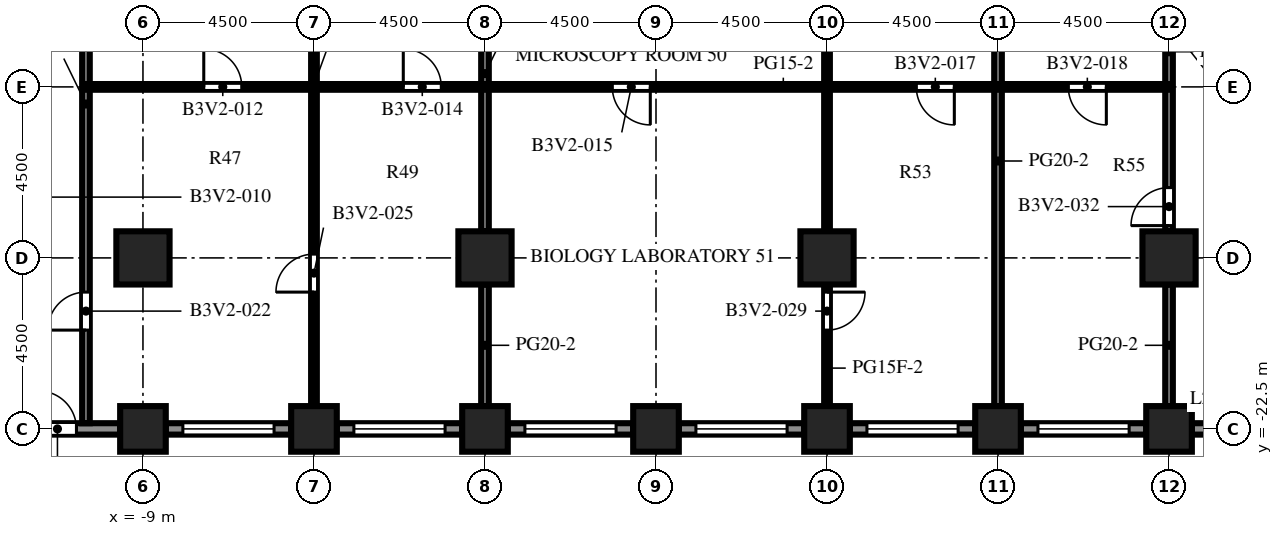
"""IFC4 building model, lengths in metres.
Left out: names, types, materials, properties, quantities, classifications, styles, units other than length and angle.
Written with IfcOpenShell. Run it as: python <this file> out.ifc"""

import sys

from ifc_helpers import new_model, si_unit, direction, frame, frame_2d, origin, origin_2d, place, context, subcontext, project, spatial, rectangle, extrude, element, fill, save


model = new_model("IFC4")
c1 = context("Model", 3, precision=1e-05, world=origin(), true_north=direction((0.0, 1.0)))
c2 = subcontext(c1, "Body", "Model", "MODEL_VIEW")
j1 = project(units=[si_unit("LENGTHUNIT", "METRE"), si_unit("PLANEANGLEUNIT", "RADIAN")], contexts=[c1])
p1 = place(None, origin())
s1 = spatial("IfcSite", under=j1, at=p1, CompositionType="ELEMENT")
p2 = place(p1, origin())
s2 = spatial("IfcBuilding", under=s1, at=p2, CompositionType="ELEMENT")
p3 = place(p2, frame((0.0, 0.0, 106.6)))
s3 = spatial("IfcBuildingStorey", under=s2, at=p3, CompositionType="ELEMENT", Elevation=106.6)
for number, where, z_axis, x_axis in (
    (1, (-9.0, -22.5, 0.0), (0.0, 0.0, 1.0), (1.0, 0.0, 0.0)),
    (2, (-4.5, -22.5, 0.0), (0.0, 0.0, 1.0), (1.0, 0.0, 0.0)),
    (3, (0.0, -22.5, 0.0), (0.0, 0.0, 1.0), (1.0, 0.0, 0.0)),
    (4, (4.5, -22.5, 0.0), (0.0, 0.0, 1.0), (1.0, 0.0, 0.0)),
    (5, (9.0, -22.5, 0.0), (0.0, 0.0, 1.0), (1.0, 0.0, 0.0)),
    (6, (13.5, -22.5, 0.0), (0.0, 0.0, 1.0), (1.0, 0.0, 0.0)),
    (7, (18.0, -22.5, 0.0), (0.0, 0.0, 1.0), (1.0, 0.0, 0.0)),
):
    element("IfcColumn", number, at=place(p3, frame(where, z_axis=z_axis, x_axis=x_axis)), inside=s3, PredefinedType="COLUMN", context=c2, shape_type="SweptSolid", body=[
        extrude(rectangle(XDim=1.2, YDim=1.2, at=origin_2d()), origin(), (0.0, 0.0, 1.0), 4.1),
    ])
for number, where, z_axis, x_axis in (
    (8, (-9.0, -18.0, 0.0), (0.0, 0.0, 1.0), (1.0, 0.0, 0.0)),
    (9, (0.0, -18.0, 0.0), (0.0, 0.0, 1.0), (1.0, 0.0, 0.0)),
    (10, (9.0, -18.0, 0.0), (0.0, 0.0, 1.0), (1.0, 0.0, 0.0)),
    (11, (18.0, -18.0, 0.0), (0.0, 0.0, 1.0), (1.0, 0.0, 0.0)),
):
    element("IfcColumn", number, at=place(p3, frame(where, z_axis=z_axis, x_axis=x_axis)), inside=s3, PredefinedType="COLUMN", context=c2, shape_type="SweptSolid", body=[
        extrude(rectangle(XDim=1.4, YDim=1.4, at=origin_2d()), origin(), (0.0, 0.0, 1.0), 4.1),
    ])
p4 = place(p3, frame((-9.6, -22.5, 0.0), z_axis=(0.0, 0.0, 1.0), x_axis=(-1.0, 0.0, 0.0)))
e12 = element("IfcWall", 12, at=p4, inside=s3, PredefinedType="SOLIDWALL", context=c2, shape_type="SweptSolid", body=[
    extrude(rectangle(XDim=3.3, YDim=0.3, at=frame_2d((1.65, 0.0))), origin(), (0.0, 0.0, 1.0), 2.6),
])
p5 = place(p4, frame((1.15, 0.0, 0.0)))
e13 = element("IfcOpeningElement", 13, at=p5, cuts=e12, PredefinedType="OPENING", context=c2, shape_type="SweptSolid", body=[
    extrude(rectangle(XDim=1.0, YDim=2.2, at=frame_2d((0.5, 1.1))), frame((0.0, 0.16, 0.0), z_axis=(0.0, -1.0, 0.0), x_axis=(1.0, 0.0, 0.0)), (0.0, 0.0, 1.0), 0.32),
])
p6 = place(p3, frame((-5.1, -22.5, 0.0), z_axis=(0.0, 0.0, 1.0), x_axis=(-1.0, 0.0, 0.0)))
e14 = element("IfcWall", 14, at=p6, inside=s3, PredefinedType="SOLIDWALL", context=c2, shape_type="SweptSolid", body=[
    extrude(rectangle(XDim=3.3, YDim=0.3, at=frame_2d((1.65, 0.0))), origin(), (0.0, 0.0, 1.0), 2.6),
])
p7 = place(p6, frame((0.45, 0.0, 0.8)))
e15 = element("IfcOpeningElement", 15, at=p7, cuts=e14, PredefinedType="OPENING", context=c2, shape_type="SweptSolid", body=[
    extrude(rectangle(XDim=2.4, YDim=1.7, at=frame_2d((1.2, 0.85))), frame((0.0, 0.16, 0.0), z_axis=(0.0, -1.0, 0.0), x_axis=(1.0, 0.0, 0.0)), (0.0, 0.0, 1.0), 0.32),
])
p8 = place(p3, frame((-0.6, -22.5, 0.0), z_axis=(0.0, 0.0, 1.0), x_axis=(-1.0, 0.0, 0.0)))
e16 = element("IfcWall", 16, at=p8, inside=s3, PredefinedType="SOLIDWALL", context=c2, shape_type="SweptSolid", body=[
    extrude(rectangle(XDim=3.3, YDim=0.3, at=frame_2d((1.65, 0.0))), origin(), (0.0, 0.0, 1.0), 2.6),
])
p9 = place(p8, frame((0.45, 0.0, 0.8)))
e17 = element("IfcOpeningElement", 17, at=p9, cuts=e16, PredefinedType="OPENING", context=c2, shape_type="SweptSolid", body=[
    extrude(rectangle(XDim=2.4, YDim=1.7, at=frame_2d((1.2, 0.85))), frame((0.0, 0.16, 0.0), z_axis=(0.0, -1.0, 0.0), x_axis=(1.0, 0.0, 0.0)), (0.0, 0.0, 1.0), 0.32),
])
p10 = place(p3, frame((3.9, -22.5, 0.0), z_axis=(0.0, 0.0, 1.0), x_axis=(-1.0, 0.0, 0.0)))
e18 = element("IfcWall", 18, at=p10, inside=s3, PredefinedType="SOLIDWALL", context=c2, shape_type="SweptSolid", body=[
    extrude(rectangle(XDim=3.3, YDim=0.3, at=frame_2d((1.65, 0.0))), origin(), (0.0, 0.0, 1.0), 2.6),
])
p11 = place(p10, frame((0.45, 0.0, 0.8)))
e19 = element("IfcOpeningElement", 19, at=p11, cuts=e18, PredefinedType="OPENING", context=c2, shape_type="SweptSolid", body=[
    extrude(rectangle(XDim=2.4, YDim=1.7, at=frame_2d((1.2, 0.85))), frame((0.0, 0.16, 0.0), z_axis=(0.0, -1.0, 0.0), x_axis=(1.0, 0.0, 0.0)), (0.0, 0.0, 1.0), 0.32),
])
p12 = place(p3, frame((8.4, -22.5, 0.0), z_axis=(0.0, 0.0, 1.0), x_axis=(-1.0, 0.0, 0.0)))
e20 = element("IfcWall", 20, at=p12, inside=s3, PredefinedType="SOLIDWALL", context=c2, shape_type="SweptSolid", body=[
    extrude(rectangle(XDim=3.3, YDim=0.3, at=frame_2d((1.65, 0.0))), origin(), (0.0, 0.0, 1.0), 2.6),
])
p13 = place(p12, frame((0.45, 0.0, 0.8)))
e21 = element("IfcOpeningElement", 21, at=p13, cuts=e20, PredefinedType="OPENING", context=c2, shape_type="SweptSolid", body=[
    extrude(rectangle(XDim=2.4, YDim=1.7, at=frame_2d((1.2, 0.85))), frame((0.0, 0.16, 0.0), z_axis=(0.0, -1.0, 0.0), x_axis=(1.0, 0.0, 0.0)), (0.0, 0.0, 1.0), 0.32),
])
p14 = place(p3, frame((12.9, -22.5, 0.0), z_axis=(0.0, 0.0, 1.0), x_axis=(-1.0, 0.0, 0.0)))
e22 = element("IfcWall", 22, at=p14, inside=s3, PredefinedType="SOLIDWALL", context=c2, shape_type="SweptSolid", body=[
    extrude(rectangle(XDim=3.3, YDim=0.3, at=frame_2d((1.65, 0.0))), origin(), (0.0, 0.0, 1.0), 2.6),
])
p15 = place(p14, frame((0.45, 0.0, 0.8)))
e23 = element("IfcOpeningElement", 23, at=p15, cuts=e22, PredefinedType="OPENING", context=c2, shape_type="SweptSolid", body=[
    extrude(rectangle(XDim=2.4, YDim=1.7, at=frame_2d((1.2, 0.85))), frame((0.0, 0.16, 0.0), z_axis=(0.0, -1.0, 0.0), x_axis=(1.0, 0.0, 0.0)), (0.0, 0.0, 1.0), 0.32),
])
p16 = place(p3, frame((17.4, -22.5, 0.0), z_axis=(0.0, 0.0, 1.0), x_axis=(-1.0, 0.0, 0.0)))
e24 = element("IfcWall", 24, at=p16, inside=s3, PredefinedType="SOLIDWALL", context=c2, shape_type="SweptSolid", body=[
    extrude(rectangle(XDim=3.3, YDim=0.3, at=frame_2d((1.65, 0.0))), origin(), (0.0, 0.0, 1.0), 2.6),
])
p17 = place(p16, frame((0.45, 0.0, 0.8)))
e25 = element("IfcOpeningElement", 25, at=p17, cuts=e24, PredefinedType="OPENING", context=c2, shape_type="SweptSolid", body=[
    extrude(rectangle(XDim=2.4, YDim=1.7, at=frame_2d((1.2, 0.85))), frame((0.0, 0.16, 0.0), z_axis=(0.0, -1.0, 0.0), x_axis=(1.0, 0.0, 0.0)), (0.0, 0.0, 1.0), 0.32),
])
p18 = place(p3, frame((21.9, -22.5, 0.0), z_axis=(0.0, 0.0, 1.0), x_axis=(-1.0, 0.0, 0.0)))
e26 = element("IfcWall", 26, at=p18, inside=s3, PredefinedType="SOLIDWALL", context=c2, shape_type="SweptSolid", body=[
    extrude(rectangle(XDim=3.3, YDim=0.3, at=frame_2d((1.65, 0.0))), origin(), (0.0, 0.0, 1.0), 2.6),
])
p19 = place(p18, frame((1.15, 0.0, 0.0)))
e27 = element("IfcOpeningElement", 27, at=p19, cuts=e26, PredefinedType="OPENING", context=c2, shape_type="SweptSolid", body=[
    extrude(rectangle(XDim=1.0, YDim=2.2, at=frame_2d((0.5, 1.1))), frame((0.0, 0.16, 0.0), z_axis=(0.0, -1.0, 0.0), x_axis=(1.0, 0.0, 0.0)), (0.0, 0.0, 1.0), 0.32),
])
p20 = place(p3, frame((-10.5, -9.0, 0.0), z_axis=(0.0, 0.0, 1.0), x_axis=(0.0, -1.0, 0.0)))
e28 = element("IfcWall", 28, at=p20, inside=s3, PredefinedType="PARTITIONING", context=c2, shape_type="SweptSolid", body=[
    extrude(rectangle(XDim=13.35, YDim=0.2, at=frame_2d((6.675, 0.0))), origin(), (0.0, 0.0, 1.0), 3.5),
])
p21 = place(p20, frame((9.9, 0.0, 0.0)))
e29 = element("IfcOpeningElement", 29, at=p21, cuts=e28, PredefinedType="OPENING", context=c2, shape_type="SweptSolid", body=[
    extrude(rectangle(XDim=1.0, YDim=2.1, at=frame_2d((0.5, 1.05))), frame((0.0, 0.11, 0.0), z_axis=(0.0, -1.0, 0.0), x_axis=(1.0, 0.0, 0.0)), (0.0, 0.0, 1.0), 0.22),
])
p22 = place(p3, frame((-4.5, -9.0, 0.0), z_axis=(0.0, 0.0, 1.0), x_axis=(0.0, -1.0, 0.0)))
e30 = element("IfcWall", 30, at=p22, inside=s3, PredefinedType="PARTITIONING", context=c2, shape_type="SweptSolid", body=[
    extrude(rectangle(XDim=12.9, YDim=0.15, at=frame_2d((6.45, 0.0))), origin(), (0.0, 0.0, 1.0), 3.5),
])
p23 = place(p22, frame((8.9, 0.0, 0.0)))
e31 = element("IfcOpeningElement", 31, at=p23, cuts=e30, PredefinedType="OPENING", context=c2, shape_type="SweptSolid", body=[
    extrude(rectangle(XDim=1.0, YDim=2.1, at=frame_2d((0.5, 1.05))), frame((0.0, 0.085, 0.0), z_axis=(0.0, -1.0, 0.0), x_axis=(1.0, 0.0, 0.0)), (0.0, 0.0, 1.0), 0.17),
])
p24 = place(p3, frame((0.0, -21.9, 0.0), z_axis=(0.0, 0.0, 1.0), x_axis=(0.0, 1.0, 0.0)))
e32 = element("IfcWall", 32, at=p24, inside=s3, PredefinedType="PARTITIONING", context=c2, shape_type="SweptSolid", body=[
    extrude(rectangle(XDim=3.2, YDim=0.2, at=frame_2d((1.6, 0.0))), origin(), (0.0, 0.0, 1.0), 3.5),
])
p25 = place(p3, frame((0.0, -17.3, 0.0), z_axis=(0.0, 0.0, 1.0), x_axis=(0.0, 1.0, 0.0)))
e33 = element("IfcWall", 33, at=p25, inside=s3, PredefinedType="PARTITIONING", context=c2, shape_type="SweptSolid", body=[
    extrude(rectangle(XDim=8.3, YDim=0.2, at=frame_2d((4.15, 0.0))), origin(), (0.0, 0.0, 1.0), 3.5),
])
p26 = place(p3, frame((9.0, -18.7, 0.0), z_axis=(0.0, 0.0, 1.0), x_axis=(0.0, -1.0, 0.0)))
e34 = element("IfcWall", 34, at=p26, inside=s3, PredefinedType="PARTITIONING", context=c2, shape_type="SweptSolid", body=[
    extrude(rectangle(XDim=3.2, YDim=0.15, at=frame_2d((1.6, 0.0))), origin(), (0.0, 0.0, 1.0), 3.5),
])
p27 = place(p26, frame((0.2, 0.0, 0.0)))
e35 = element("IfcOpeningElement", 35, at=p27, cuts=e34, PredefinedType="OPENING", context=c2, shape_type="SweptSolid", body=[
    extrude(rectangle(XDim=1.0, YDim=2.1, at=frame_2d((0.5, 1.05))), frame((0.0, 0.085, 0.0), z_axis=(0.0, -1.0, 0.0), x_axis=(1.0, 0.0, 0.0)), (0.0, 0.0, 1.0), 0.17),
])
p28 = place(p3, frame((9.0, -17.3, 0.0), z_axis=(0.0, 0.0, 1.0), x_axis=(0.0, 1.0, 0.0)))
e36 = element("IfcWall", 36, at=p28, inside=s3, PredefinedType="PARTITIONING", context=c2, shape_type="SweptSolid", body=[
    extrude(rectangle(XDim=8.3, YDim=0.15, at=frame_2d((4.15, 0.0))), origin(), (0.0, 0.0, 1.0), 3.5),
])
p29 = place(p3, frame((13.5, -21.9, 0.0), z_axis=(0.0, 0.0, 1.0), x_axis=(0.0, 1.0, 0.0)))
e37 = element("IfcWall", 37, at=p29, inside=s3, PredefinedType="PARTITIONING", context=c2, shape_type="SweptSolid", body=[
    extrude(rectangle(XDim=12.9, YDim=0.2, at=frame_2d((6.45, 0.0))), origin(), (0.0, 0.0, 1.0), 3.5),
])
p30 = place(p3, frame((18.0, -21.9, 0.0), z_axis=(0.0, 0.0, 1.0), x_axis=(0.0, 1.0, 0.0)))
e38 = element("IfcWall", 38, at=p30, inside=s3, PredefinedType="PARTITIONING", context=c2, shape_type="SweptSolid", body=[
    extrude(rectangle(XDim=3.2, YDim=0.2, at=frame_2d((1.6, 0.0))), origin(), (0.0, 0.0, 1.0), 3.5),
])
p31 = place(p3, frame((18.0, -17.3, 0.0), z_axis=(0.0, 0.0, 1.0), x_axis=(0.0, 1.0, 0.0)))
e39 = element("IfcWall", 39, at=p31, inside=s3, PredefinedType="PARTITIONING", context=c2, shape_type="SweptSolid", body=[
    extrude(rectangle(XDim=8.3, YDim=0.2, at=frame_2d((4.15, 0.0))), origin(), (0.0, 0.0, 1.0), 3.5),
])
p32 = place(p31, frame((0.15, 0.0, 0.0)))
e40 = element("IfcOpeningElement", 40, at=p32, cuts=e39, PredefinedType="OPENING", context=c2, shape_type="SweptSolid", body=[
    extrude(rectangle(XDim=1.0, YDim=2.1, at=frame_2d((0.5, 1.05))), frame((0.0, 0.11, 0.0), z_axis=(0.0, -1.0, 0.0), x_axis=(1.0, 0.0, 0.0)), (0.0, 0.0, 1.0), 0.22),
])
p33 = place(p3, frame((-10.5, -13.5, 0.0), z_axis=(0.0, 0.0, 1.0), x_axis=(1.0, 0.0, 0.0)))
e41 = element("IfcWall", 41, at=p33, inside=s3, PredefinedType="PARTITIONING", context=c2, shape_type="SweptSolid", body=[
    extrude(rectangle(XDim=28.5, YDim=0.15, at=frame_2d((14.25, 0.0))), origin(), (0.0, 0.0, 1.0), 3.5),
])
p34 = place(p33, frame((3.1, 0.0, 0.0)))
e42 = element("IfcOpeningElement", 42, at=p34, cuts=e41, PredefinedType="OPENING", context=c2, shape_type="SweptSolid", body=[
    extrude(rectangle(XDim=1.0, YDim=2.1, at=frame_2d((0.5, 1.05))), frame((0.0, 0.085, 0.0), z_axis=(0.0, -1.0, 0.0), x_axis=(1.0, 0.0, 0.0)), (0.0, 0.0, 1.0), 0.17),
])
p35 = place(p33, frame((8.35, 0.0, 0.0)))
e43 = element("IfcOpeningElement", 43, at=p35, cuts=e41, PredefinedType="OPENING", context=c2, shape_type="SweptSolid", body=[
    extrude(rectangle(XDim=1.0, YDim=2.1, at=frame_2d((0.5, 1.05))), frame((0.0, 0.085, 0.0), z_axis=(0.0, -1.0, 0.0), x_axis=(1.0, 0.0, 0.0)), (0.0, 0.0, 1.0), 0.17),
])
p36 = place(p33, frame((13.85, 0.0, 0.0)))
e44 = element("IfcOpeningElement", 44, at=p36, cuts=e41, PredefinedType="OPENING", context=c2, shape_type="SweptSolid", body=[
    extrude(rectangle(XDim=1.0, YDim=2.1, at=frame_2d((0.5, 1.05))), frame((0.0, 0.085, 0.0), z_axis=(0.0, -1.0, 0.0), x_axis=(1.0, 0.0, 0.0)), (0.0, 0.0, 1.0), 0.17),
])
p37 = place(p33, frame((21.85, 0.0, 0.0)))
e45 = element("IfcOpeningElement", 45, at=p37, cuts=e41, PredefinedType="OPENING", context=c2, shape_type="SweptSolid", body=[
    extrude(rectangle(XDim=1.0, YDim=2.1, at=frame_2d((0.5, 1.05))), frame((0.0, 0.085, 0.0), z_axis=(0.0, -1.0, 0.0), x_axis=(1.0, 0.0, 0.0)), (0.0, 0.0, 1.0), 0.17),
])
p38 = place(p33, frame((25.85, 0.0, 0.0)))
e46 = element("IfcOpeningElement", 46, at=p38, cuts=e41, PredefinedType="OPENING", context=c2, shape_type="SweptSolid", body=[
    extrude(rectangle(XDim=1.0, YDim=2.1, at=frame_2d((0.5, 1.05))), frame((0.0, 0.085, 0.0), z_axis=(0.0, -1.0, 0.0), x_axis=(1.0, 0.0, 0.0)), (0.0, 0.0, 1.0), 0.17),
])
p39 = place(p5, origin())
e47 = element("IfcDoor", 47, at=p39, inside=s3, OperationType="SINGLE_SWING_RIGHT", PredefinedType="DOOR", context=c2, shape_type="SweptSolid", body=[
    extrude(rectangle(XDim=1.0, YDim=2.2, at=frame_2d((0.5, 1.1))), frame((0.0, 0.025, 0.0), z_axis=(0.0, -1.0, 0.0), x_axis=(1.0, 0.0, 0.0)), (0.0, 0.0, 1.0), 0.05),
])
fill(e13, e47)
p40 = place(p7, origin())
e48 = element("IfcWindow", 48, at=p40, inside=s3, PartitioningType="SINGLE_PANEL", PredefinedType="WINDOW", context=c2, shape_type="SweptSolid", body=[
    extrude(rectangle(XDim=2.4, YDim=1.7, at=frame_2d((1.2, 0.85))), frame((0.0, 0.03, 0.0), z_axis=(0.0, -1.0, 0.0), x_axis=(1.0, 0.0, 0.0)), (0.0, 0.0, 1.0), 0.06),
])
fill(e15, e48)
p41 = place(p9, origin())
e49 = element("IfcWindow", 49, at=p41, inside=s3, PartitioningType="SINGLE_PANEL", PredefinedType="WINDOW", context=c2, shape_type="SweptSolid", body=[
    extrude(rectangle(XDim=2.4, YDim=1.7, at=frame_2d((1.2, 0.85))), frame((0.0, 0.03, 0.0), z_axis=(0.0, -1.0, 0.0), x_axis=(1.0, 0.0, 0.0)), (0.0, 0.0, 1.0), 0.06),
])
fill(e17, e49)
p42 = place(p11, origin())
e50 = element("IfcWindow", 50, at=p42, inside=s3, PartitioningType="SINGLE_PANEL", PredefinedType="WINDOW", context=c2, shape_type="SweptSolid", body=[
    extrude(rectangle(XDim=2.4, YDim=1.7, at=frame_2d((1.2, 0.85))), frame((0.0, 0.03, 0.0), z_axis=(0.0, -1.0, 0.0), x_axis=(1.0, 0.0, 0.0)), (0.0, 0.0, 1.0), 0.06),
])
fill(e19, e50)
p43 = place(p13, origin())
e51 = element("IfcWindow", 51, at=p43, inside=s3, PartitioningType="SINGLE_PANEL", PredefinedType="WINDOW", context=c2, shape_type="SweptSolid", body=[
    extrude(rectangle(XDim=2.4, YDim=1.7, at=frame_2d((1.2, 0.85))), frame((0.0, 0.03, 0.0), z_axis=(0.0, -1.0, 0.0), x_axis=(1.0, 0.0, 0.0)), (0.0, 0.0, 1.0), 0.06),
])
fill(e21, e51)
p44 = place(p15, origin())
e52 = element("IfcWindow", 52, at=p44, inside=s3, PartitioningType="SINGLE_PANEL", PredefinedType="WINDOW", context=c2, shape_type="SweptSolid", body=[
    extrude(rectangle(XDim=2.4, YDim=1.7, at=frame_2d((1.2, 0.85))), frame((0.0, 0.03, 0.0), z_axis=(0.0, -1.0, 0.0), x_axis=(1.0, 0.0, 0.0)), (0.0, 0.0, 1.0), 0.06),
])
fill(e23, e52)
p45 = place(p17, origin())
e53 = element("IfcWindow", 53, at=p45, inside=s3, PartitioningType="SINGLE_PANEL", PredefinedType="WINDOW", context=c2, shape_type="SweptSolid", body=[
    extrude(rectangle(XDim=2.4, YDim=1.7, at=frame_2d((1.2, 0.85))), frame((0.0, 0.03, 0.0), z_axis=(0.0, -1.0, 0.0), x_axis=(1.0, 0.0, 0.0)), (0.0, 0.0, 1.0), 0.06),
])
fill(e25, e53)
p46 = place(p34, origin())
e54 = element("IfcDoor", 54, at=p46, inside=s3, OperationType="SINGLE_SWING_LEFT", PredefinedType="DOOR", context=c2, shape_type="SweptSolid", body=[
    extrude(rectangle(XDim=1.0, YDim=2.1, at=frame_2d((0.5, 1.05))), frame((0.0, 0.025, 0.0), z_axis=(0.0, -1.0, 0.0), x_axis=(1.0, 0.0, 0.0)), (0.0, 0.0, 1.0), 0.05),
])
fill(e42, e54)
p47 = place(p35, origin())
e55 = element("IfcDoor", 55, at=p47, inside=s3, OperationType="SINGLE_SWING_LEFT", PredefinedType="DOOR", context=c2, shape_type="SweptSolid", body=[
    extrude(rectangle(XDim=1.0, YDim=2.1, at=frame_2d((0.5, 1.05))), frame((0.0, 0.025, 0.0), z_axis=(0.0, -1.0, 0.0), x_axis=(1.0, 0.0, 0.0)), (0.0, 0.0, 1.0), 0.05),
])
fill(e43, e55)
p48 = place(p36, origin())
e56 = element("IfcDoor", 56, at=p48, inside=s3, OperationType="SINGLE_SWING_RIGHT", PredefinedType="DOOR", context=c2, shape_type="SweptSolid", body=[
    extrude(rectangle(XDim=1.0, YDim=2.1, at=frame_2d((0.5, 1.05))), frame((0.0, 0.025, 0.0), z_axis=(0.0, -1.0, 0.0), x_axis=(1.0, 0.0, 0.0)), (0.0, 0.0, 1.0), 0.05),
])
fill(e44, e56)
p49 = place(p37, origin())
e57 = element("IfcDoor", 57, at=p49, inside=s3, OperationType="SINGLE_SWING_RIGHT", PredefinedType="DOOR", context=c2, shape_type="SweptSolid", body=[
    extrude(rectangle(XDim=1.0, YDim=2.1, at=frame_2d((0.5, 1.05))), frame((0.0, 0.025, 0.0), z_axis=(0.0, -1.0, 0.0), x_axis=(1.0, 0.0, 0.0)), (0.0, 0.0, 1.0), 0.05),
])
fill(e45, e57)
p50 = place(p38, origin())
e58 = element("IfcDoor", 58, at=p50, inside=s3, OperationType="SINGLE_SWING_RIGHT", PredefinedType="DOOR", context=c2, shape_type="SweptSolid", body=[
    extrude(rectangle(XDim=1.0, YDim=2.1, at=frame_2d((0.5, 1.05))), frame((0.0, 0.025, 0.0), z_axis=(0.0, -1.0, 0.0), x_axis=(1.0, 0.0, 0.0)), (0.0, 0.0, 1.0), 0.05),
])
fill(e46, e58)
p51 = place(p21, origin())
e59 = element("IfcDoor", 59, at=p51, inside=s3, OperationType="SINGLE_SWING_RIGHT", PredefinedType="DOOR", context=c2, shape_type="SweptSolid", body=[
    extrude(rectangle(XDim=1.0, YDim=2.1, at=frame_2d((0.5, 1.05))), frame((0.0, 0.025, 0.0), z_axis=(0.0, -1.0, 0.0), x_axis=(1.0, 0.0, 0.0)), (0.0, 0.0, 1.0), 0.05),
])
fill(e29, e59)
p52 = place(p23, origin())
e60 = element("IfcDoor", 60, at=p52, inside=s3, OperationType="SINGLE_SWING_RIGHT", PredefinedType="DOOR", context=c2, shape_type="SweptSolid", body=[
    extrude(rectangle(XDim=1.0, YDim=2.1, at=frame_2d((0.5, 1.05))), frame((0.0, 0.025, 0.0), z_axis=(0.0, -1.0, 0.0), x_axis=(1.0, 0.0, 0.0)), (0.0, 0.0, 1.0), 0.05),
])
fill(e31, e60)
p53 = place(p27, origin())
e61 = element("IfcDoor", 61, at=p53, inside=s3, OperationType="SINGLE_SWING_LEFT", PredefinedType="DOOR", context=c2, shape_type="SweptSolid", body=[
    extrude(rectangle(XDim=1.0, YDim=2.1, at=frame_2d((0.5, 1.05))), frame((0.0, 0.025, 0.0), z_axis=(0.0, -1.0, 0.0), x_axis=(1.0, 0.0, 0.0)), (0.0, 0.0, 1.0), 0.05),
])
fill(e35, e61)
p54 = place(p32, origin())
e62 = element("IfcDoor", 62, at=p54, inside=s3, OperationType="SINGLE_SWING_LEFT", PredefinedType="DOOR", context=c2, shape_type="SweptSolid", body=[
    extrude(rectangle(XDim=1.0, YDim=2.1, at=frame_2d((0.5, 1.05))), frame((0.0, 0.025, 0.0), z_axis=(0.0, -1.0, 0.0), x_axis=(1.0, 0.0, 0.0)), (0.0, 0.0, 1.0), 0.05),
])
fill(e40, e62)
save(model, sys.argv[1])
